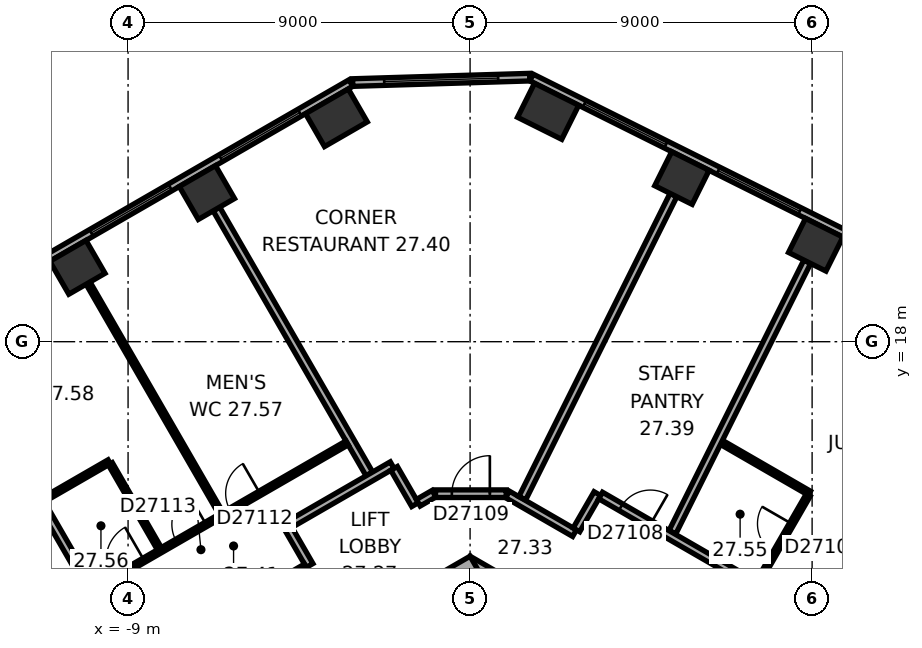
"""IFC4 building model, lengths in metres.
Left out: names, types, materials, properties, quantities, classifications, styles, units other than length and angle.
Written with IfcOpenShell. Run it as: python <this file> out.ifc"""

import sys

from ifc_helpers import new_model, si_unit, direction, frame, frame_2d, origin, origin_2d, place, context, subcontext, project, spatial, rectangle, extrude, element, fill, save


model = new_model("IFC4")
c1 = context("Model", 3, precision=1e-05, world=origin(), true_north=direction((0.0, 1.0)))
c2 = subcontext(c1, "Body", "Model", "MODEL_VIEW")
j1 = project(units=[si_unit("LENGTHUNIT", "METRE"), si_unit("PLANEANGLEUNIT", "RADIAN")], contexts=[c1])
p1 = place(None, origin())
s1 = spatial("IfcSite", under=j1, at=p1, CompositionType="ELEMENT")
p2 = place(p1, origin())
s2 = spatial("IfcBuilding", under=s1, at=p2, CompositionType="ELEMENT")
p3 = place(p2, frame((0.0, 0.0, 113.3)))
s3 = spatial("IfcBuildingStorey", under=s2, at=p3, CompositionType="ELEMENT", Elevation=113.3)
for number, where, z_axis, x_axis in (
    (1, (9.095, 20.551, 0.0), (0.0, 0.0, 1.0), (-0.895, 0.446, 0.0)),
    (2, (5.574, 22.306, 0.0), (0.0, 0.0, 1.0), (-0.895, 0.446, 0.0)),
):
    element("IfcColumn", number, at=place(p3, frame(where, z_axis=z_axis, x_axis=x_axis)), inside=s3, PredefinedType="COLUMN", context=c2, shape_type="SweptSolid", body=[
        extrude(rectangle(XDim=1.1, YDim=1.0, at=origin_2d()), origin(), (0.0, 0.0, 1.0), 3.3),
    ])
for number, where, z_axis, x_axis in (
    (3, (2.053, 24.062, 0.0), (0.0, 0.0, 1.0), (-0.895, 0.446, 0.0)),
    (4, (-3.518, 23.892, 0.0), (0.0, 0.0, 1.0), (-0.866, -0.5, 0.0)),
):
    element("IfcColumn", number, at=place(p3, frame(where, z_axis=z_axis, x_axis=x_axis)), inside=s3, PredefinedType="COLUMN", context=c2, shape_type="SweptSolid", body=[
        extrude(rectangle(XDim=1.3, YDim=1.0, at=origin_2d()), origin(), (0.0, 0.0, 1.0), 3.3),
    ])
for number, where, z_axis, x_axis in (
    (5, (-6.926, 21.925, 0.0), (0.0, 0.0, 1.0), (-0.866, -0.5, 0.0)),
    (6, (-10.333, 19.957, 0.0), (0.0, 0.0, 1.0), (-0.866, -0.5, 0.0)),
):
    element("IfcColumn", number, at=place(p3, frame(where, z_axis=z_axis, x_axis=x_axis)), inside=s3, PredefinedType="COLUMN", context=c2, shape_type="SweptSolid", body=[
        extrude(rectangle(XDim=1.1, YDim=1.0, at=origin_2d()), origin(), (0.0, 0.0, 1.0), 3.3),
    ])
p4 = place(p3, frame((10.4, 5.658, 0.0), z_axis=(0.0, 0.0, 1.0), x_axis=(-0.866021384402, 0.500006961711, 0.0)))
e7 = element("IfcWall", 7, at=p4, inside=s3, PredefinedType="SHEAR", context=c2, shape_type="SweptSolid", body=[
    extrude(rectangle(XDim=12.355, YDim=1.2, at=frame_2d((6.178, 0.0))), origin(), (0.0, 0.0, 1.0), 3.3),
])
p5 = place(p4, frame((2.728, 0.0, 0.0)))
e8 = element("IfcOpeningElement", 8, at=p5, cuts=e7, PredefinedType="OPENING", context=c2, shape_type="SweptSolid", body=[
    extrude(rectangle(XDim=1.1, YDim=2.1, at=frame_2d((0.55, 1.05))), frame((0.0, 0.61, 0.0), z_axis=(0.0, -1.0, 0.0), x_axis=(1.0, 0.0, 0.0)), (0.0, 0.0, 1.0), 1.22),
])
p6 = place(p4, frame((5.328, 0.0, 0.0)))
e9 = element("IfcOpeningElement", 9, at=p6, cuts=e7, PredefinedType="OPENING", context=c2, shape_type="SweptSolid", body=[
    extrude(rectangle(XDim=1.1, YDim=2.1, at=frame_2d((0.55, 1.05))), frame((0.0, 0.61, 0.0), z_axis=(0.0, -1.0, 0.0), x_axis=(1.0, 0.0, 0.0)), (0.0, 0.0, 1.0), 1.22),
])
p7 = place(p4, frame((7.928, 0.0, 0.0)))
e10 = element("IfcOpeningElement", 10, at=p7, cuts=e7, PredefinedType="OPENING", context=c2, shape_type="SweptSolid", body=[
    extrude(rectangle(XDim=1.1, YDim=2.1, at=frame_2d((0.55, 1.05))), frame((0.0, 0.61, 0.0), z_axis=(0.0, -1.0, 0.0), x_axis=(1.0, 0.0, 0.0)), (0.0, 0.0, 1.0), 1.22),
])
p8 = place(p3, frame((0.3, 11.836, 0.0), z_axis=(0.0, 0.0, 1.0), x_axis=(-0.866021384402, -0.500006961711, 0.0)))
e11 = element("IfcWall", 11, at=p8, inside=s3, PredefinedType="SHEAR", context=c2, shape_type="SweptSolid", body=[
    extrude(rectangle(XDim=12.355, YDim=1.2, at=frame_2d((6.178, 0.0))), origin(), (0.0, 0.0, 1.0), 3.3),
])
p9 = place(p8, frame((6.378, 0.0, 0.0)))
e12 = element("IfcOpeningElement", 12, at=p9, cuts=e11, PredefinedType="OPENING", context=c2, shape_type="SweptSolid", body=[
    extrude(rectangle(XDim=1.5, YDim=2.1, at=frame_2d((0.75, 1.05))), frame((0.0, 0.61, 0.0), z_axis=(0.0, -1.0, 0.0), x_axis=(1.0, 0.0, 0.0)), (0.0, 0.0, 1.0), 1.22),
])
p10 = place(p8, frame((1.828, 0.0, 0.0)))
e13 = element("IfcOpeningElement", 13, at=p10, cuts=e11, PredefinedType="OPENING", context=c2, shape_type="SweptSolid", body=[
    extrude(rectangle(XDim=1.1, YDim=2.1, at=frame_2d((0.55, 1.05))), frame((0.0, 0.61, 0.0), z_axis=(0.0, -1.0, 0.0), x_axis=(1.0, 0.0, 0.0)), (0.0, 0.0, 1.0), 1.22),
])
p11 = place(p3, frame((20.63, 15.47, 0.0), z_axis=(0.0, 0.0, 1.0), x_axis=(-0.894934518609, 0.446197498203, 0.0)))
e14 = element("IfcWall", 14, at=p11, inside=s3, PredefinedType="STANDARD", context=c2, shape_type="SweptSolid", body=[
    extrude(rectangle(XDim=21.246, YDim=0.2, at=frame_2d((10.623, 0.0))), origin(), (0.0, 0.0, 1.0), 3.3),
])
p12 = place(p11, frame((1.553, 0.0, 0.8)))
e15 = element("IfcOpeningElement", 15, at=p12, cuts=e14, PredefinedType="OPENING", context=c2, shape_type="SweptSolid", body=[
    extrude(rectangle(XDim=2.4, YDim=1.7, at=frame_2d((1.2, 0.85))), frame((0.0, 0.11, 0.0), z_axis=(0.0, -1.0, 0.0), x_axis=(1.0, 0.0, 0.0)), (0.0, 0.0, 1.0), 0.22),
])
p13 = place(p11, frame((5.488, 0.0, 0.8)))
e16 = element("IfcOpeningElement", 16, at=p13, cuts=e14, PredefinedType="OPENING", context=c2, shape_type="SweptSolid", body=[
    extrude(rectangle(XDim=2.4, YDim=1.7, at=frame_2d((1.2, 0.85))), frame((0.0, 0.11, 0.0), z_axis=(0.0, -1.0, 0.0), x_axis=(1.0, 0.0, 0.0)), (0.0, 0.0, 1.0), 0.22),
])
p14 = place(p11, frame((9.422, 0.0, 0.8)))
e17 = element("IfcOpeningElement", 17, at=p14, cuts=e14, PredefinedType="OPENING", context=c2, shape_type="SweptSolid", body=[
    extrude(rectangle(XDim=2.4, YDim=1.7, at=frame_2d((1.2, 0.85))), frame((0.0, 0.11, 0.0), z_axis=(0.0, -1.0, 0.0), x_axis=(1.0, 0.0, 0.0)), (0.0, 0.0, 1.0), 0.22),
])
p15 = place(p11, frame((13.357, 0.0, 0.8)))
e18 = element("IfcOpeningElement", 18, at=p15, cuts=e14, PredefinedType="OPENING", context=c2, shape_type="SweptSolid", body=[
    extrude(rectangle(XDim=2.4, YDim=1.7, at=frame_2d((1.2, 0.85))), frame((0.0, 0.11, 0.0), z_axis=(0.0, -1.0, 0.0), x_axis=(1.0, 0.0, 0.0)), (0.0, 0.0, 1.0), 0.22),
])
p16 = place(p11, frame((17.292, 0.0, 0.8)))
e19 = element("IfcOpeningElement", 19, at=p16, cuts=e14, PredefinedType="OPENING", context=c2, shape_type="SweptSolid", body=[
    extrude(rectangle(XDim=2.4, YDim=1.7, at=frame_2d((1.2, 0.85))), frame((0.0, 0.11, 0.0), z_axis=(0.0, -1.0, 0.0), x_axis=(1.0, 0.0, 0.0)), (0.0, 0.0, 1.0), 0.22),
])
p17 = place(p3, frame((1.568, 24.961, 0.0), z_axis=(0.0, 0.0, 1.0), x_axis=(-0.999533359013, -0.030546099927, 0.0)))
e20 = element("IfcWall", 20, at=p17, inside=s3, PredefinedType="STANDARD", context=c2, shape_type="SweptSolid", body=[
    extrude(rectangle(XDim=4.66, YDim=0.2, at=frame_2d((2.33, 0.0))), origin(), (0.0, 0.0, 1.0), 3.3),
])
p18 = place(p17, frame((0.83, 0.0, 0.8)))
e21 = element("IfcOpeningElement", 21, at=p18, cuts=e20, PredefinedType="OPENING", context=c2, shape_type="SweptSolid", body=[
    extrude(rectangle(XDim=3.0, YDim=1.7, at=frame_2d((1.5, 0.85))), frame((0.0, 0.11, 0.0), z_axis=(0.0, -1.0, 0.0), x_axis=(1.0, 0.0, 0.0)), (0.0, 0.0, 1.0), 0.22),
])
p19 = place(p3, frame((-3.136, 24.805, 0.0), z_axis=(0.0, 0.0, 1.0), x_axis=(-0.866028291626, -0.499994998079, 0.0)))
e22 = element("IfcWall", 22, at=p19, inside=s3, PredefinedType="STANDARD", context=c2, shape_type="SweptSolid", body=[
    extrude(rectangle(XDim=21.246, YDim=0.2, at=frame_2d((10.623, 0.0))), origin(), (0.0, 0.0, 1.0), 3.3),
])
p20 = place(p19, frame((1.555, 0.0, 0.8)))
e23 = element("IfcOpeningElement", 23, at=p20, cuts=e22, PredefinedType="OPENING", context=c2, shape_type="SweptSolid", body=[
    extrude(rectangle(XDim=2.4, YDim=1.7, at=frame_2d((1.2, 0.85))), frame((0.0, 0.11, 0.0), z_axis=(0.0, -1.0, 0.0), x_axis=(1.0, 0.0, 0.0)), (0.0, 0.0, 1.0), 0.22),
])
p21 = place(p19, frame((5.489, 0.0, 0.8)))
e24 = element("IfcOpeningElement", 24, at=p21, cuts=e22, PredefinedType="OPENING", context=c2, shape_type="SweptSolid", body=[
    extrude(rectangle(XDim=2.4, YDim=1.7, at=frame_2d((1.2, 0.85))), frame((0.0, 0.11, 0.0), z_axis=(0.0, -1.0, 0.0), x_axis=(1.0, 0.0, 0.0)), (0.0, 0.0, 1.0), 0.22),
])
p22 = place(p19, frame((9.424, 0.0, 0.8)))
e25 = element("IfcOpeningElement", 25, at=p22, cuts=e22, PredefinedType="OPENING", context=c2, shape_type="SweptSolid", body=[
    extrude(rectangle(XDim=2.4, YDim=1.7, at=frame_2d((1.2, 0.85))), frame((0.0, 0.11, 0.0), z_axis=(0.0, -1.0, 0.0), x_axis=(1.0, 0.0, 0.0)), (0.0, 0.0, 1.0), 0.22),
])
p23 = place(p19, frame((13.358, 0.0, 0.8)))
e26 = element("IfcOpeningElement", 26, at=p23, cuts=e22, PredefinedType="OPENING", context=c2, shape_type="SweptSolid", body=[
    extrude(rectangle(XDim=2.4, YDim=1.7, at=frame_2d((1.2, 0.85))), frame((0.0, 0.11, 0.0), z_axis=(0.0, -1.0, 0.0), x_axis=(1.0, 0.0, 0.0)), (0.0, 0.0, 1.0), 0.22),
])
p24 = place(p19, frame((17.293, 0.0, 0.8)))
e27 = element("IfcOpeningElement", 27, at=p24, cuts=e22, PredefinedType="OPENING", context=c2, shape_type="SweptSolid", body=[
    extrude(rectangle(XDim=2.4, YDim=1.7, at=frame_2d((1.2, 0.85))), frame((0.0, 0.11, 0.0), z_axis=(0.0, -1.0, 0.0), x_axis=(1.0, 0.0, 0.0)), (0.0, 0.0, 1.0), 0.22),
])
p25 = place(p3, frame((-10.053, 19.542, 0.0), z_axis=(0.0, 0.0, 1.0), x_axis=(0.49998952364, -0.866031452229, 0.0)))
e28 = element("IfcWall", 28, at=p25, inside=s3, PredefinedType="PARTITIONING", context=c2, shape_type="SweptSolid", body=[
    extrude(rectangle(XDim=6.99, YDim=0.12, at=frame_2d((3.495, 0.0))), origin(), (0.0, 0.0, 1.0), 2.6),
])
p26 = place(p3, frame((-9.497, 14.84, 0.0), z_axis=(0.0, 0.0, 1.0), x_axis=(-0.866041268327, -0.499972520799, 0.0)))
e29 = element("IfcWall", 29, at=p26, inside=s3, PredefinedType="PARTITIONING", context=c2, shape_type="SweptSolid", body=[
    extrude(rectangle(XDim=2.0, YDim=0.12, at=frame_2d((1.0, 0.0))), origin(), (0.0, 0.0, 1.0), 3.05),
])
p27 = place(p3, frame((-8.177, 12.553, 0.0), z_axis=(0.0, 0.0, 1.0), x_axis=(-0.500006411147, 0.866021702275, 0.0)))
e30 = element("IfcWall", 30, at=p27, inside=s3, PredefinedType="PARTITIONING", context=c2, shape_type="SweptSolid", body=[
    extrude(rectangle(XDim=2.58, YDim=0.12, at=frame_2d((1.29, 0.0))), origin(), (0.0, 0.0, 1.0), 3.05),
])
p28 = place(p3, frame((-7.865, 7.814, 0.0), z_axis=(0.0, 0.0, 1.0), x_axis=(-0.500004234368, 0.866022959057, 0.0)))
e31 = element("IfcWall", 31, at=p28, inside=s3, PredefinedType="PARTITIONING", context=c2, shape_type="SweptSolid", body=[
    extrude(rectangle(XDim=11.25, YDim=0.2, at=frame_2d((5.625, 0.0))), origin(), (0.0, 0.0, 1.0), 3.05),
])
p29 = place(p28, frame((0.5, 0.0, 0.0)))
e32 = element("IfcOpeningElement", 32, at=p29, cuts=e31, PredefinedType="OPENING", context=c2, shape_type="SweptSolid", body=[
    extrude(rectangle(XDim=0.9, YDim=2.1, at=frame_2d((0.45, 1.05))), frame((0.0, 0.11, 0.0), z_axis=(0.0, -1.0, 0.0), x_axis=(1.0, 0.0, 0.0)), (0.0, 0.0, 1.0), 0.22),
])
p30 = place(p3, frame((-6.676, 21.492, 0.0), z_axis=(0.0, 0.0, 1.0), x_axis=(0.500011263043, -0.866018900966, 0.0)))
e33 = element("IfcWall", 33, at=p30, inside=s3, PredefinedType="PARTITIONING", context=c2, shape_type="SweptSolid", body=[
    extrude(rectangle(XDim=8.049, YDim=0.2, at=frame_2d((4.024, 0.0))), origin(), (0.0, 0.0, 1.0), 3.05),
])
p31 = place(p3, frame((-4.823, 13.152, 0.0), z_axis=(0.0, 0.0, 1.0), x_axis=(0.499986357472, -0.866033280158, 0.0)))
e34 = element("IfcWall", 34, at=p31, inside=s3, PredefinedType="PARTITIONING", context=c2, shape_type="SweptSolid", body=[
    extrude(rectangle(XDim=1.201, YDim=0.2, at=frame_2d((0.601, 0.0))), origin(), (0.0, 0.0, 1.0), 3.05),
])
p32 = place(p3, frame((-4.309, 12.061, 0.0), z_axis=(0.0, 0.0, 1.0), x_axis=(-0.866020679205, -0.500008183122, 0.0)))
e35 = element("IfcWall", 35, at=p32, inside=s3, PredefinedType="PARTITIONING", context=c2, shape_type="SweptSolid", body=[
    extrude(rectangle(XDim=5.104, YDim=0.2, at=frame_2d((2.552, 0.0))), origin(), (0.0, 0.0, 1.0), 3.05),
])
p33 = place(p32, frame((2.052, 0.0, 0.0)))
e36 = element("IfcOpeningElement", 36, at=p33, cuts=e35, PredefinedType="OPENING", context=c2, shape_type="SweptSolid", body=[
    extrude(rectangle(XDim=1.0, YDim=2.1, at=frame_2d((0.5, 1.05))), frame((0.0, 0.11, 0.0), z_axis=(0.0, -1.0, 0.0), x_axis=(1.0, 0.0, 0.0)), (0.0, 0.0, 1.0), 0.22),
])
p34 = place(p3, frame((-3.237, 15.336, 0.0), z_axis=(0.0, 0.0, 1.0), x_axis=(-0.866022840924, -0.500004438978, 0.0)))
e37 = element("IfcWall", 37, at=p34, inside=s3, PredefinedType="PARTITIONING", context=c2, shape_type="SweptSolid", body=[
    extrude(rectangle(XDim=7.669, YDim=0.12, at=frame_2d((3.835, 0.0))), origin(), (0.0, 0.0, 1.0), 3.05),
])
p35 = place(p34, frame((6.169, 0.0, 0.0)))
e38 = element("IfcOpeningElement", 38, at=p35, cuts=e37, PredefinedType="OPENING", context=c2, shape_type="SweptSolid", body=[
    extrude(rectangle(XDim=1.0, YDim=2.1, at=frame_2d((0.5, 1.05))), frame((0.0, 0.07, 0.0), z_axis=(0.0, -1.0, 0.0), x_axis=(1.0, 0.0, 0.0)), (0.0, 0.0, 1.0), 0.14),
])
p36 = place(p34, frame((2.65, 0.0, 0.0)))
e39 = element("IfcOpeningElement", 39, at=p36, cuts=e37, PredefinedType="OPENING", context=c2, shape_type="SweptSolid", body=[
    extrude(rectangle(XDim=0.9, YDim=2.1, at=frame_2d((0.45, 1.05))), frame((0.0, 0.07, 0.0), z_axis=(0.0, -1.0, 0.0), x_axis=(1.0, 0.0, 0.0)), (0.0, 0.0, 1.0), 0.14),
])
p37 = place(p34, frame((4.285, 0.0, 0.0)))
e40 = element("IfcOpeningElement", 40, at=p37, cuts=e37, PredefinedType="OPENING", context=c2, shape_type="SweptSolid", body=[
    extrude(rectangle(XDim=0.9, YDim=2.1, at=frame_2d((0.45, 1.05))), frame((0.0, 0.07, 0.0), z_axis=(0.0, -1.0, 0.0), x_axis=(1.0, 0.0, 0.0)), (0.0, 0.0, 1.0), 0.14),
])
p38 = place(p3, frame((-2.05, 14.752, 0.0), z_axis=(0.0, 0.0, 1.0), x_axis=(-0.866030936828, -0.499990416364, 0.0)))
e41 = element("IfcWall", 41, at=p38, inside=s3, PredefinedType="PARTITIONING", context=c2, shape_type="SweptSolid", body=[
    extrude(rectangle(XDim=3.102, YDim=0.2, at=frame_2d((1.551, 0.0))), origin(), (0.0, 0.0, 1.0), 3.05),
])
p39 = place(p3, frame((-1.449, 13.712, 0.0), z_axis=(0.0, 0.0, 1.0), x_axis=(-0.499978356969, 0.866037899034, 0.0)))
e42 = element("IfcWall", 42, at=p39, inside=s3, PredefinedType="PARTITIONING", context=c2, shape_type="SweptSolid", body=[
    extrude(rectangle(XDim=1.101, YDim=0.2, at=frame_2d((0.551, 0.0))), origin(), (0.0, 0.0, 1.0), 3.05),
])
p40 = place(p3, frame((-0.95, 14.001, 0.0), z_axis=(0.0, 0.0, 1.0), x_axis=(-0.86609177584, -0.499885022602, 0.0)))
e43 = element("IfcWall", 43, at=p40, inside=s3, PredefinedType="PARTITIONING", context=c2, shape_type="SweptSolid", body=[
    extrude(rectangle(XDim=0.477, YDim=0.2, at=frame_2d((0.238, 0.0))), origin(), (0.0, 0.0, 1.0), 3.05),
])
p41 = place(p3, frame((0.95, 14.001, 0.0), z_axis=(0.0, 0.0, 1.0), x_axis=(-1.0, 0.0, 0.0)))
e44 = element("IfcWall", 44, at=p41, inside=s3, PredefinedType="PARTITIONING", context=c2, shape_type="SweptSolid", body=[
    extrude(rectangle(XDim=1.86, YDim=0.2, at=frame_2d((0.93, 0.0))), origin(), (0.0, 0.0, 1.0), 3.05),
])
p42 = place(p41, frame((0.43, 0.0, 0.0)))
e45 = element("IfcOpeningElement", 45, at=p42, cuts=e44, PredefinedType="OPENING", context=c2, shape_type="SweptSolid", body=[
    extrude(rectangle(XDim=1.0, YDim=2.1, at=frame_2d((0.5, 1.05))), frame((0.0, 0.11, 0.0), z_axis=(0.0, -1.0, 0.0), x_axis=(1.0, 0.0, 0.0)), (0.0, 0.0, 1.0), 0.22),
])
p43 = place(p3, frame((2.748, 12.962, 0.0), z_axis=(0.0, 0.0, 1.0), x_axis=(-0.866013897511, 0.50001992892, 0.0)))
e46 = element("IfcWall", 46, at=p43, inside=s3, PredefinedType="PARTITIONING", context=c2, shape_type="SweptSolid", body=[
    extrude(rectangle(XDim=2.037, YDim=0.2, at=frame_2d((1.018, 0.0))), origin(), (0.0, 0.0, 1.0), 3.05),
])
p44 = place(p3, frame((3.349, 14.002, 0.0), z_axis=(0.0, 0.0, 1.0), x_axis=(-0.500074377092, -0.865982457891, 0.0)))
e47 = element("IfcWall", 47, at=p44, inside=s3, PredefinedType="PARTITIONING", context=c2, shape_type="SweptSolid", body=[
    extrude(rectangle(XDim=1.101, YDim=0.2, at=frame_2d((0.55, 0.0))), origin(), (0.0, 0.0, 1.0), 3.05),
])
p45 = place(p3, frame((5.351, 21.859, 0.0), z_axis=(0.0, 0.0, 1.0), x_axis=(-0.446205309328, -0.894930624086, 0.0)))
e48 = element("IfcWall", 48, at=p45, inside=s3, PredefinedType="PARTITIONING", context=c2, shape_type="SweptSolid", body=[
    extrude(rectangle(XDim=8.913, YDim=0.2, at=frame_2d((4.457, 0.0))), origin(), (0.0, 0.0, 1.0), 2.6),
])
p46 = place(p3, frame((6.614, 15.351, 0.0), z_axis=(0.0, 0.0, 1.0), x_axis=(0.866024262117, -0.500001977421, 0.0)))
e49 = element("IfcWall", 49, at=p46, inside=s3, PredefinedType="PARTITIONING", context=c2, shape_type="SweptSolid", body=[
    extrude(rectangle(XDim=2.671, YDim=0.12, at=frame_2d((1.336, 0.0))), origin(), (0.0, 0.0, 1.0), 3.05),
])
p47 = place(p3, frame((8.872, 20.104, 0.0), z_axis=(0.0, 0.0, 1.0), x_axis=(-0.446218378653, -0.894924107706, 0.0)))
e50 = element("IfcWall", 50, at=p47, inside=s3, PredefinedType="PARTITIONING", context=c2, shape_type="SweptSolid", body=[
    extrude(rectangle(XDim=7.95, YDim=0.2, at=frame_2d((3.975, 0.0))), origin(), (0.0, 0.0, 1.0), 3.05),
])
p48 = place(p3, frame((8.897, 13.963, 0.0), z_axis=(0.0, 0.0, 1.0), x_axis=(-0.500048002682, -0.865997687649, 0.0)))
e51 = element("IfcWall", 51, at=p48, inside=s3, PredefinedType="PARTITIONING", context=c2, shape_type="SweptSolid", body=[
    extrude(rectangle(XDim=2.64, YDim=0.12, at=frame_2d((1.32, 0.0))), origin(), (0.0, 0.0, 1.0), 2.6),
])
p49 = place(p48, frame((0.87, 0.0, 0.0)))
e52 = element("IfcOpeningElement", 52, at=p49, cuts=e51, PredefinedType="OPENING", context=c2, shape_type="SweptSolid", body=[
    extrude(rectangle(XDim=0.9, YDim=2.1, at=frame_2d((0.45, 1.05))), frame((0.0, 0.07, 0.0), z_axis=(0.0, -1.0, 0.0), x_axis=(1.0, 0.0, 0.0)), (0.0, 0.0, 1.0), 0.14),
])
p50 = place(p3, frame((10.885, 9.652, 0.0), z_axis=(0.0, 0.0, 1.0), x_axis=(-0.866033868542, 0.499985338323, 0.0)))
e53 = element("IfcWall", 53, at=p50, inside=s3, PredefinedType="PARTITIONING", context=c2, shape_type="SweptSolid", body=[
    extrude(rectangle(XDim=8.602, YDim=0.2, at=frame_2d((4.301, 0.0))), origin(), (0.0, 0.0, 1.0), 3.05),
])
p51 = place(p50, frame((1.464, 0.0, 0.0)))
e54 = element("IfcOpeningElement", 54, at=p51, cuts=e53, PredefinedType="OPENING", context=c2, shape_type="SweptSolid", body=[
    extrude(rectangle(XDim=0.9, YDim=2.1, at=frame_2d((0.45, 1.05))), frame((0.0, 0.11, 0.0), z_axis=(0.0, -1.0, 0.0), x_axis=(1.0, 0.0, 0.0)), (0.0, 0.0, 1.0), 0.22),
])
p52 = place(p50, frame((7.09, 0.0, 0.0)))
e55 = element("IfcOpeningElement", 55, at=p52, cuts=e53, PredefinedType="OPENING", context=c2, shape_type="SweptSolid", body=[
    extrude(rectangle(XDim=0.9, YDim=2.1, at=frame_2d((0.45, 1.05))), frame((0.0, 0.11, 0.0), z_axis=(0.0, -1.0, 0.0), x_axis=(1.0, 0.0, 0.0)), (0.0, 0.0, 1.0), 0.22),
])
p53 = place(p15, origin())
e56 = element("IfcWindow", 56, at=p53, inside=s3, PartitioningType="SINGLE_PANEL", PredefinedType="WINDOW", context=c2, shape_type="SweptSolid", body=[
    extrude(rectangle(XDim=2.4, YDim=1.7, at=frame_2d((1.2, 0.85))), frame((0.0, 0.03, 0.0), z_axis=(0.0, -1.0, 0.0), x_axis=(1.0, 0.0, 0.0)), (0.0, 0.0, 1.0), 0.06),
])
fill(e18, e56)
p54 = place(p16, origin())
e57 = element("IfcWindow", 57, at=p54, inside=s3, PartitioningType="SINGLE_PANEL", PredefinedType="WINDOW", context=c2, shape_type="SweptSolid", body=[
    extrude(rectangle(XDim=2.4, YDim=1.7, at=frame_2d((1.2, 0.85))), frame((0.0, 0.03, 0.0), z_axis=(0.0, -1.0, 0.0), x_axis=(1.0, 0.0, 0.0)), (0.0, 0.0, 1.0), 0.06),
])
fill(e19, e57)
p55 = place(p18, origin())
e58 = element("IfcWindow", 58, at=p55, inside=s3, PartitioningType="SINGLE_PANEL", PredefinedType="WINDOW", context=c2, shape_type="SweptSolid", body=[
    extrude(rectangle(XDim=3.0, YDim=1.7, at=frame_2d((1.5, 0.85))), frame((0.0, 0.03, 0.0), z_axis=(0.0, -1.0, 0.0), x_axis=(1.0, 0.0, 0.0)), (0.0, 0.0, 1.0), 0.06),
])
fill(e21, e58)
p56 = place(p20, origin())
e59 = element("IfcWindow", 59, at=p56, inside=s3, PartitioningType="SINGLE_PANEL", PredefinedType="WINDOW", context=c2, shape_type="SweptSolid", body=[
    extrude(rectangle(XDim=2.4, YDim=1.7, at=frame_2d((1.2, 0.85))), frame((0.0, 0.03, 0.0), z_axis=(0.0, -1.0, 0.0), x_axis=(1.0, 0.0, 0.0)), (0.0, 0.0, 1.0), 0.06),
])
fill(e23, e59)
p57 = place(p21, origin())
e60 = element("IfcWindow", 60, at=p57, inside=s3, PartitioningType="SINGLE_PANEL", PredefinedType="WINDOW", context=c2, shape_type="SweptSolid", body=[
    extrude(rectangle(XDim=2.4, YDim=1.7, at=frame_2d((1.2, 0.85))), frame((0.0, 0.03, 0.0), z_axis=(0.0, -1.0, 0.0), x_axis=(1.0, 0.0, 0.0)), (0.0, 0.0, 1.0), 0.06),
])
fill(e24, e60)
p58 = place(p49, origin())
e61 = element("IfcDoor", 61, at=p58, inside=s3, OperationType="SINGLE_SWING_LEFT", PredefinedType="DOOR", context=c2, shape_type="SweptSolid", body=[
    extrude(rectangle(XDim=0.9, YDim=2.1, at=frame_2d((0.45, 1.05))), frame((0.0, 0.025, 0.0), z_axis=(0.0, -1.0, 0.0), x_axis=(1.0, 0.0, 0.0)), (0.0, 0.0, 1.0), 0.05),
])
fill(e52, e61)
p59 = place(p52, origin())
e62 = element("IfcDoor", 62, at=p59, inside=s3, OperationType="SINGLE_SWING_LEFT", PredefinedType="DOOR", context=c2, shape_type="SweptSolid", body=[
    extrude(rectangle(XDim=0.9, YDim=2.1, at=frame_2d((0.45, 1.05))), frame((0.0, 0.025, 0.0), z_axis=(0.0, -1.0, 0.0), x_axis=(1.0, 0.0, 0.0)), (0.0, 0.0, 1.0), 0.05),
])
fill(e55, e62)
p60 = place(p42, origin())
e63 = element("IfcDoor", 63, at=p60, inside=s3, OperationType="SINGLE_SWING_LEFT", PredefinedType="DOOR", context=c2, shape_type="SweptSolid", body=[
    extrude(rectangle(XDim=1.0, YDim=2.1, at=frame_2d((0.5, 1.05))), frame((0.0, 0.025, 0.0), z_axis=(0.0, -1.0, 0.0), x_axis=(1.0, 0.0, 0.0)), (0.0, 0.0, 1.0), 0.05),
])
fill(e45, e63)
p61 = place(p35, origin())
e64 = element("IfcDoor", 64, at=p61, inside=s3, OperationType="SINGLE_SWING_LEFT", PredefinedType="DOOR", context=c2, shape_type="SweptSolid", body=[
    extrude(rectangle(XDim=1.0, YDim=2.1, at=frame_2d((0.5, 1.05))), frame((0.0, 0.025, 0.0), z_axis=(0.0, -1.0, 0.0), x_axis=(1.0, 0.0, 0.0)), (0.0, 0.0, 1.0), 0.05),
])
fill(e38, e64)
p62 = place(p36, origin())
e65 = element("IfcDoor", 65, at=p62, inside=s3, OperationType="SINGLE_SWING_LEFT", PredefinedType="DOOR", context=c2, shape_type="SweptSolid", body=[
    extrude(rectangle(XDim=0.9, YDim=2.1, at=frame_2d((0.45, 1.05))), frame((0.0, 0.025, 0.0), z_axis=(0.0, -1.0, 0.0), x_axis=(1.0, 0.0, 0.0)), (0.0, 0.0, 1.0), 0.05),
])
fill(e39, e65)
p63 = place(p37, origin())
e66 = element("IfcDoor", 66, at=p63, inside=s3, OperationType="SINGLE_SWING_LEFT", PredefinedType="DOOR", context=c2, shape_type="SweptSolid", body=[
    extrude(rectangle(XDim=0.9, YDim=2.1, at=frame_2d((0.45, 1.05))), frame((0.0, 0.025, 0.0), z_axis=(0.0, -1.0, 0.0), x_axis=(1.0, 0.0, 0.0)), (0.0, 0.0, 1.0), 0.05),
])
fill(e40, e66)
save(model, sys.argv[1])
